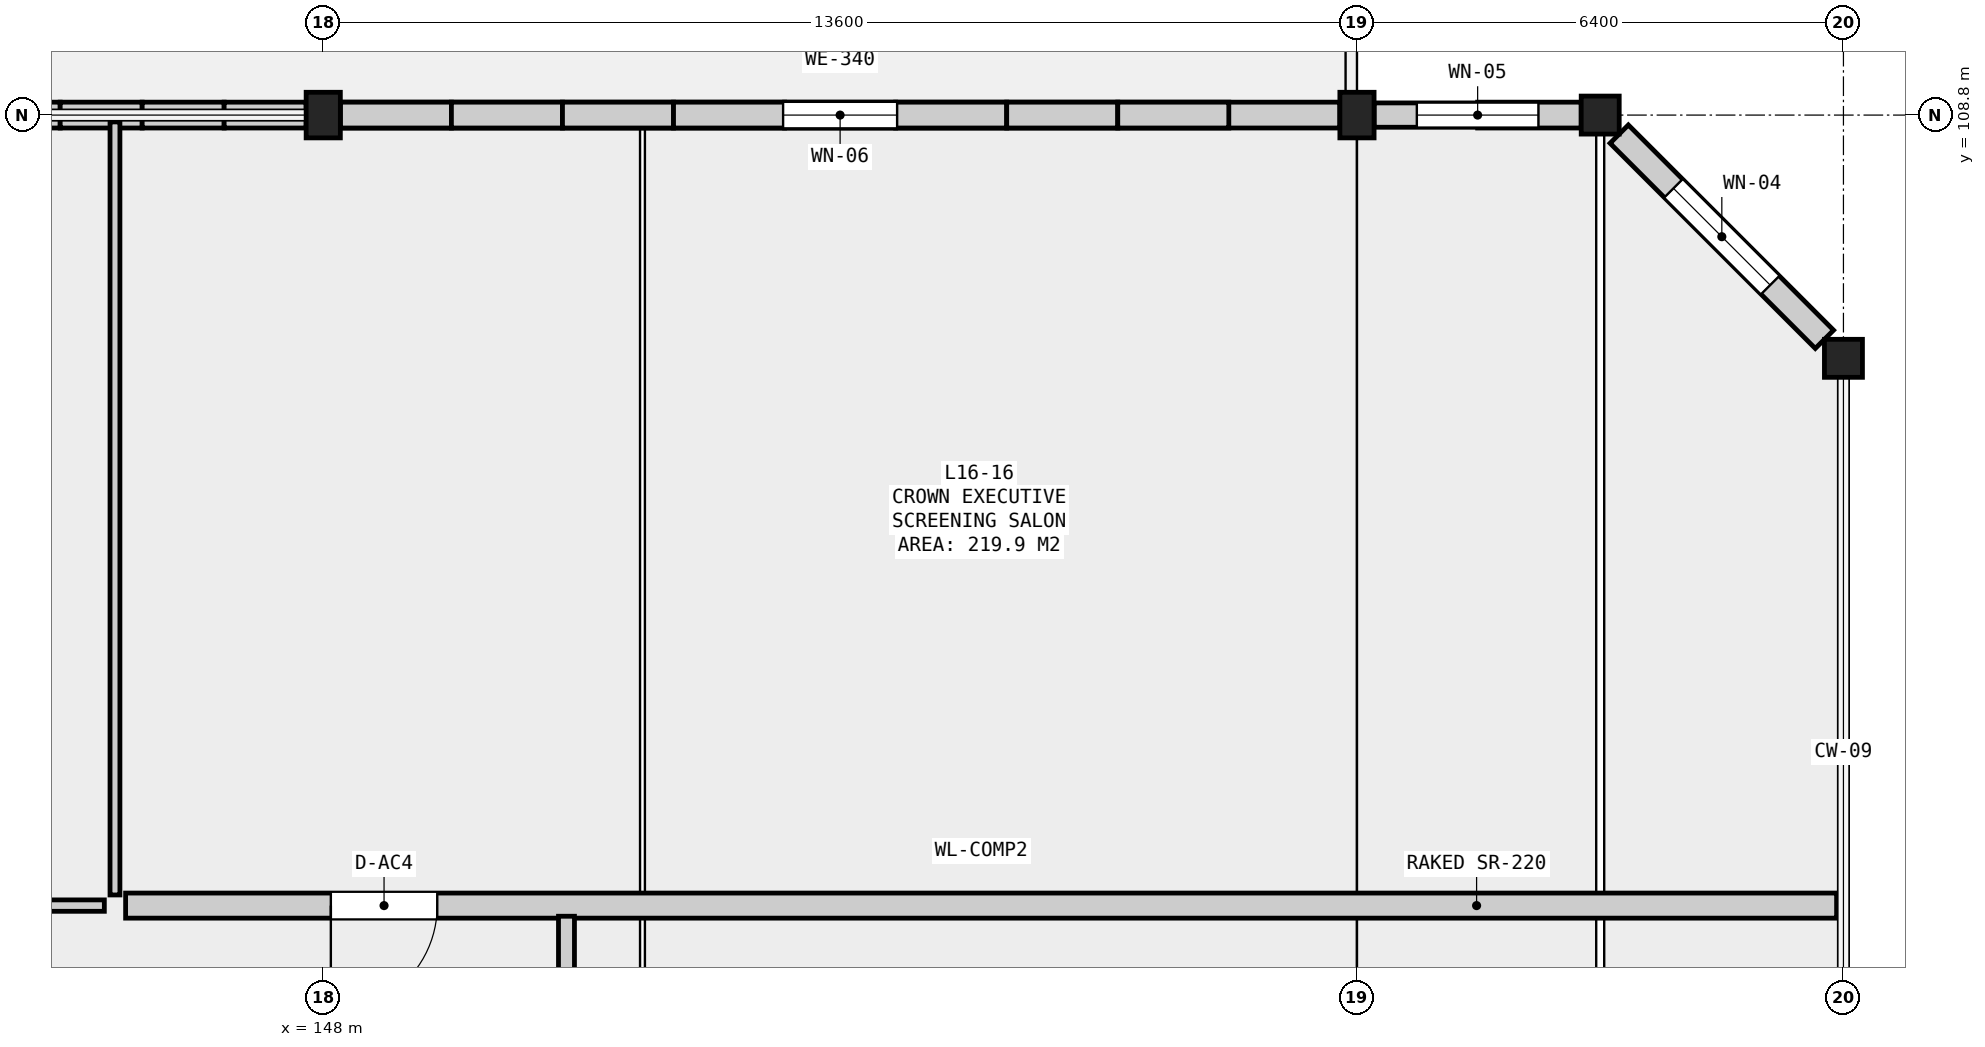
"""IFC4 building model, lengths in metres.
Left out: names, types, materials, properties, quantities, classifications, styles, units other than length and angle.
Written with IfcOpenShell. Run it as: python <this file> out.ifc"""

import sys

from ifc_helpers import new_model, si_unit, direction, frame, frame_2d, origin, origin_2d, place, context, subcontext, project, spatial, rectangle, circle, extrude, element, fill, save


model = new_model("IFC4")
c1 = context("Model", 3, precision=1e-05, world=origin(), true_north=direction((0.0, 1.0)))
c2 = subcontext(c1, "Body", "Model", "MODEL_VIEW")
j1 = project(units=[si_unit("LENGTHUNIT", "METRE"), si_unit("PLANEANGLEUNIT", "RADIAN")], contexts=[c1])
p1 = place(None, origin())
s1 = spatial("IfcSite", under=j1, at=p1, CompositionType="ELEMENT")
p2 = place(p1, origin())
s2 = spatial("IfcBuilding", under=s1, at=p2, CompositionType="ELEMENT")
p3 = place(p2, frame((0.0, 0.0, 66.6)))
s3 = spatial("IfcBuildingStorey", under=s2, at=p3, CompositionType="ELEMENT", Elevation=66.6)
for number, where, z_axis, x_axis in (
    (1, (148.0, 108.8, 0.0), (0.0, 0.0, 1.0), (1.0, 0.0, 0.0)),
    (2, (161.6, 108.8, 0.0), (0.0, 0.0, 1.0), (1.0, 0.0, 0.0)),
):
    element("IfcColumn", number, at=place(p3, frame(where, z_axis=z_axis, x_axis=x_axis)), inside=s3, PredefinedType="COLUMN", context=c2, shape_type="SweptSolid", body=[
        extrude(rectangle(XDim=0.45, YDim=0.6, at=origin_2d()), origin(), (0.0, 0.0, 1.0), 4.5),
    ])
for number, where, z_axis, x_axis in (
    (3, (164.8, 108.8, 0.0), (0.0, 0.0, 1.0), (1.0, 0.0, 0.0)),
    (4, (168.0, 105.6, 0.0), (0.0, 0.0, 1.0), (1.0, 0.0, 0.0)),
):
    element("IfcColumn", number, at=place(p3, frame(where, z_axis=z_axis, x_axis=x_axis)), inside=s3, PredefinedType="COLUMN", context=c2, shape_type="SweptSolid", body=[
        extrude(circle(Radius=0.25, at=origin_2d()), origin(), (0.0, 0.0, 1.0), 4.5),
    ])
p4 = place(p3, frame((167.75, 105.85, 0.0), z_axis=(0.0, 0.0, 1.0), x_axis=(-0.707106781187, 0.707106781187, 0.0)))
e5 = element("IfcWall", 5, at=p4, inside=s3, PredefinedType="SOLIDWALL", context=c2, shape_type="SweptSolid", body=[
    extrude(rectangle(XDim=3.818, YDim=0.34, at=frame_2d((1.909, 0.0))), origin(), (0.0, 0.0, 1.0), 3.62),
])
p5 = place(p4, frame((1.009, 0.0, 0.9)))
e6 = element("IfcOpeningElement", 6, at=p5, cuts=e5, PredefinedType="OPENING", context=c2, shape_type="SweptSolid", body=[
    extrude(rectangle(XDim=1.8, YDim=1.85, at=frame_2d((0.9, 0.925))), frame((0.0, 0.182, 0.0), z_axis=(0.0, -1.0, 0.0), x_axis=(1.0, 0.0, 0.0)), (0.0, 0.0, 1.0), 0.364),
])
p6 = place(p3, frame((164.55, 108.8, 0.0), z_axis=(0.0, 0.0, 1.0), x_axis=(-1.0, 0.0, 0.0)))
e7 = element("IfcWall", 7, at=p6, inside=s3, PredefinedType="SOLIDWALL", context=c2, shape_type="SweptSolid", body=[
    extrude(rectangle(XDim=2.725, YDim=0.32, at=frame_2d((1.363, 0.0))), origin(), (0.0, 0.0, 1.0), 3.6),
])
p7 = place(p6, frame((0.562, 0.0, 0.9)))
e8 = element("IfcOpeningElement", 8, at=p7, cuts=e7, PredefinedType="OPENING", context=c2, shape_type="SweptSolid", body=[
    extrude(rectangle(XDim=1.6, YDim=1.95, at=frame_2d((0.8, 0.975))), frame((0.0, 0.172, 0.0), z_axis=(0.0, -1.0, 0.0), x_axis=(1.0, 0.0, 0.0)), (0.0, 0.0, 1.0), 0.344),
])
p8 = place(p3, frame((161.375, 108.8, 0.0), z_axis=(0.0, 0.0, 1.0), x_axis=(-1.0, 0.0, 0.0)))
e9 = element("IfcWall", 9, at=p8, inside=s3, PredefinedType="SOLIDWALL", context=c2, shape_type="SweptSolid", body=[
    extrude(rectangle(XDim=13.15, YDim=0.34, at=frame_2d((6.575, 0.0))), origin(), (0.0, 0.0, 1.0), 3.4),
])
p9 = place(p8, frame((5.825, 0.0, 0.9)))
e10 = element("IfcOpeningElement", 10, at=p9, cuts=e9, PredefinedType="OPENING", context=c2, shape_type="SweptSolid", body=[
    extrude(rectangle(XDim=1.5, YDim=1.85, at=frame_2d((0.75, 0.925))), frame((0.0, 0.182, 0.0), z_axis=(0.0, -1.0, 0.0), x_axis=(1.0, 0.0, 0.0)), (0.0, 0.0, 1.0), 0.364),
])
p10 = place(p3, frame((143.461, 108.8, 4.5), z_axis=(0.0, 0.0, 1.0), x_axis=(1.0, 0.0, 0.0)))
e11 = element("IfcWall", 11, at=p10, inside=s3, PredefinedType="SOLIDWALL", context=c2, shape_type="SweptSolid", body=[
    extrude(rectangle(XDim=1.079, YDim=0.34, at=frame_2d((0.539, 0.0))), origin(), (0.0, 0.0, 1.0), 3.342),
])
p11 = place(p3, frame((144.539, 108.8, 4.5), z_axis=(0.0, 0.0, 1.0), x_axis=(1.0, 0.0, 0.0)))
e12 = element("IfcWall", 12, at=p11, inside=s3, PredefinedType="SOLIDWALL", context=c2, shape_type="SweptSolid", body=[
    extrude(rectangle(XDim=1.079, YDim=0.34, at=frame_2d((0.539, 0.0))), origin(), (0.0, 0.0, 1.0), 3.148),
])
p12 = place(p3, frame((145.618, 108.8, 4.5), z_axis=(0.0, 0.0, 1.0), x_axis=(1.0, 0.0, 0.0)))
e13 = element("IfcWall", 13, at=p12, inside=s3, PredefinedType="SOLIDWALL", context=c2, shape_type="SweptSolid", body=[
    extrude(rectangle(XDim=1.078, YDim=0.34, at=frame_2d((0.539, 0.0))), origin(), (0.0, 0.0, 1.0), 2.954),
])
p13 = place(p3, frame((146.696, 108.8, 4.5), z_axis=(0.0, 0.0, 1.0), x_axis=(1.0, 0.0, 0.0)))
e14 = element("IfcWall", 14, at=p13, inside=s3, PredefinedType="SOLIDWALL", context=c2, shape_type="SweptSolid", body=[
    extrude(rectangle(XDim=1.079, YDim=0.34, at=frame_2d((0.539, 0.0))), origin(), (0.0, 0.0, 1.0), 2.76),
])
p14 = place(p3, frame((148.225, 108.8, 4.5), z_axis=(0.0, 0.0, 1.0), x_axis=(1.0, 0.0, 0.0)))
e15 = element("IfcWall", 15, at=p14, inside=s3, PredefinedType="SOLIDWALL", context=c2, shape_type="SweptSolid", body=[
    extrude(rectangle(XDim=1.461, YDim=0.34, at=frame_2d((0.73, 0.0))), origin(), (0.0, 0.0, 1.0), 2.416),
])
p15 = place(p3, frame((149.686, 108.8, 4.5), z_axis=(0.0, 0.0, 1.0), x_axis=(1.0, 0.0, 0.0)))
e16 = element("IfcWall", 16, at=p15, inside=s3, PredefinedType="SOLIDWALL", context=c2, shape_type="SweptSolid", body=[
    extrude(rectangle(XDim=1.461, YDim=0.34, at=frame_2d((0.73, 0.0))), origin(), (0.0, 0.0, 1.0), 2.153),
])
p16 = place(p3, frame((151.147, 108.8, 4.5), z_axis=(0.0, 0.0, 1.0), x_axis=(1.0, 0.0, 0.0)))
e17 = element("IfcWall", 17, at=p16, inside=s3, PredefinedType="SOLIDWALL", context=c2, shape_type="SweptSolid", body=[
    extrude(rectangle(XDim=1.461, YDim=0.34, at=frame_2d((0.73, 0.0))), origin(), (0.0, 0.0, 1.0), 1.878),
])
p17 = place(p3, frame((152.608, 108.8, 4.5), z_axis=(0.0, 0.0, 1.0), x_axis=(1.0, 0.0, 0.0)))
e18 = element("IfcWall", 18, at=p17, inside=s3, PredefinedType="SOLIDWALL", context=c2, shape_type="SweptSolid", body=[
    extrude(rectangle(XDim=1.461, YDim=0.34, at=frame_2d((0.73, 0.0))), origin(), (0.0, 0.0, 1.0), 1.573),
])
p18 = place(p3, frame((154.069, 108.8, 4.5), z_axis=(0.0, 0.0, 1.0), x_axis=(1.0, 0.0, 0.0)))
e19 = element("IfcWall", 19, at=p18, inside=s3, PredefinedType="SOLIDWALL", context=c2, shape_type="SweptSolid", body=[
    extrude(rectangle(XDim=1.461, YDim=0.34, at=frame_2d((0.73, 0.0))), origin(), (0.0, 0.0, 1.0), 1.268),
])
p19 = place(p3, frame((155.531, 108.8, 4.5), z_axis=(0.0, 0.0, 1.0), x_axis=(1.0, 0.0, 0.0)))
e20 = element("IfcWall", 20, at=p19, inside=s3, PredefinedType="SOLIDWALL", context=c2, shape_type="SweptSolid", body=[
    extrude(rectangle(XDim=1.461, YDim=0.34, at=frame_2d((0.73, 0.0))), origin(), (0.0, 0.0, 1.0), 0.963),
])
p20 = place(p3, frame((156.992, 108.8, 4.5), z_axis=(0.0, 0.0, 1.0), x_axis=(1.0, 0.0, 0.0)))
e21 = element("IfcWall", 21, at=p20, inside=s3, PredefinedType="SOLIDWALL", context=c2, shape_type="SweptSolid", body=[
    extrude(rectangle(XDim=1.461, YDim=0.34, at=frame_2d((0.73, 0.0))), origin(), (0.0, 0.0, 1.0), 0.657),
])
p21 = place(p3, frame((158.453, 108.8, 4.5), z_axis=(0.0, 0.0, 1.0), x_axis=(1.0, 0.0, 0.0)))
e22 = element("IfcWall", 22, at=p21, inside=s3, PredefinedType="SOLIDWALL", context=c2, shape_type="SweptSolid", body=[
    extrude(rectangle(XDim=1.461, YDim=0.34, at=frame_2d((0.73, 0.0))), origin(), (0.0, 0.0, 1.0), 0.352),
])
p22 = place(p3, frame((163.188, 108.8, 4.5), z_axis=(0.0, 0.0, 1.0), x_axis=(1.0, 0.0, 0.0)))
e23 = element("IfcWall", 23, at=p22, inside=s3, PredefinedType="SOLIDWALL", context=c2, shape_type="SweptSolid", body=[
    extrude(rectangle(XDim=1.363, YDim=0.34, at=frame_2d((0.681, 0.0))), origin(), (0.0, 0.0, 1.0), 0.578),
])
p23 = place(p3, frame((116.985, 98.4, 0.0), z_axis=(0.0, 0.0, 1.0), x_axis=(1.0, 0.0, 0.0)))
e24 = element("IfcWall", 24, at=p23, inside=s3, PredefinedType="PARTITIONING", context=c2, shape_type="SweptSolid", body=[
    extrude(rectangle(XDim=28.135, YDim=0.15, at=frame_2d((14.067, 0.0))), origin(), (0.0, 0.0, 1.0), 3.55),
])
p24 = place(p23, frame((18.49, 0.0, 0.0)))
e25 = element("IfcOpeningElement", 25, at=p24, cuts=e24, PredefinedType="OPENING", context=c2, shape_type="SweptSolid", body=[
    extrude(rectangle(XDim=1.05, YDim=2.15, at=frame_2d((0.525, 1.075))), frame((0.0, 0.087, 0.0), z_axis=(0.0, -1.0, 0.0), x_axis=(1.0, 0.0, 0.0)), (0.0, 0.0, 1.0), 0.174),
])
p25 = place(p3, frame((145.26, 98.54, 0.0), z_axis=(0.0, 0.0, 1.0), x_axis=(0.0, 1.0, 0.0)))
e26 = element("IfcWall", 26, at=p25, inside=s3, PredefinedType="PARTITIONING", context=c2, shape_type="SweptSolid", body=[
    extrude(rectangle(XDim=10.17, YDim=0.13, at=frame_2d((5.085, 0.0))), origin(), (0.0, 0.0, 1.0), 3.55),
])
p26 = place(p3, frame((145.4, 98.4, 0.0), z_axis=(0.0, 0.0, 1.0), x_axis=(1.0, 0.0, 0.0)))
e27 = element("IfcWall", 27, at=p26, inside=s3, PredefinedType="SOLIDWALL", context=c2, shape_type="SweptSolid", body=[
    extrude(rectangle(XDim=22.51, YDim=0.33, at=frame_2d((11.255, 0.0))), origin(), (0.0, 0.0, 1.0), 3.55),
])
p27 = place(p26, frame((2.7, 0.0, 0.0)))
e28 = element("IfcOpeningElement", 28, at=p27, cuts=e27, PredefinedType="OPENING", context=c2, shape_type="SweptSolid", body=[
    extrude(rectangle(XDim=1.4, YDim=2.2, at=frame_2d((0.7, 1.1))), frame((0.0, 0.177, 0.0), z_axis=(0.0, -1.0, 0.0), x_axis=(1.0, 0.0, 0.0)), (0.0, 0.0, 1.0), 0.354),
])
p28 = place(p3, frame((151.2, 72.175, 0.0), z_axis=(0.0, 0.0, 1.0), x_axis=(0.0, 1.0, 0.0)))
e29 = element("IfcWall", 29, at=p28, inside=s3, PredefinedType="SOLIDWALL", context=c2, shape_type="SweptSolid", body=[
    extrude(rectangle(XDim=26.085, YDim=0.21, at=frame_2d((13.042, 0.0))), origin(), (0.0, 0.0, 1.0), 3.55),
])
p29 = place(p28, frame((14.325, 0.0, 0.0)))
e30 = element("IfcOpeningElement", 30, at=p29, cuts=e29, PredefinedType="OPENING", context=c2, shape_type="SweptSolid", body=[
    extrude(rectangle(XDim=1.4, YDim=2.2, at=frame_2d((0.7, 1.1))), frame((0.0, 0.117, 0.0), z_axis=(0.0, -1.0, 0.0), x_axis=(1.0, 0.0, 0.0)), (0.0, 0.0, 1.0), 0.234),
])
p30 = place(p5, origin())
e31 = element("IfcWindow", 31, at=p30, inside=s3, PartitioningType="DOUBLE_PANEL_VERTICAL", PredefinedType="WINDOW", context=c2, shape_type="SweptSolid", body=[
    extrude(rectangle(XDim=1.8, YDim=1.85, at=frame_2d((0.9, 0.925))), frame((0.0, 0.03, 0.0), z_axis=(0.0, -1.0, 0.0), x_axis=(1.0, 0.0, 0.0)), (0.0, 0.0, 1.0), 0.06),
])
fill(e6, e31)
p31 = place(p7, origin())
e32 = element("IfcWindow", 32, at=p31, inside=s3, PartitioningType="DOUBLE_PANEL_VERTICAL", PredefinedType="WINDOW", context=c2, shape_type="SweptSolid", body=[
    extrude(rectangle(XDim=1.6, YDim=1.95, at=frame_2d((0.8, 0.975))), frame((0.0, 0.03, 0.0), z_axis=(0.0, -1.0, 0.0), x_axis=(1.0, 0.0, 0.0)), (0.0, 0.0, 1.0), 0.06),
])
fill(e8, e32)
p32 = place(p9, origin())
e33 = element("IfcWindow", 33, at=p32, inside=s3, PartitioningType="SINGLE_PANEL", PredefinedType="WINDOW", context=c2, shape_type="SweptSolid", body=[
    extrude(rectangle(XDim=1.5, YDim=1.85, at=frame_2d((0.75, 0.925))), frame((0.0, 0.03, 0.0), z_axis=(0.0, -1.0, 0.0), x_axis=(1.0, 0.0, 0.0)), (0.0, 0.0, 1.0), 0.06),
])
fill(e10, e33)
p33 = place(p27, frame((1.4, 0.0, 0.0), z_axis=(0.0, 0.0, 1.0), x_axis=(-1.0, 0.0, 0.0)))
e34 = element("IfcDoor", 34, at=p33, inside=s3, OperationType="SINGLE_SWING_RIGHT", PredefinedType="DOOR", context=c2, shape_type="SweptSolid", body=[
    extrude(rectangle(XDim=1.4, YDim=2.2, at=frame_2d((0.7, 1.1))), frame((0.0, 0.025, 0.0), z_axis=(0.0, -1.0, 0.0), x_axis=(1.0, 0.0, 0.0)), (0.0, 0.0, 1.0), 0.05),
])
fill(e28, e34)
save(model, sys.argv[1])
